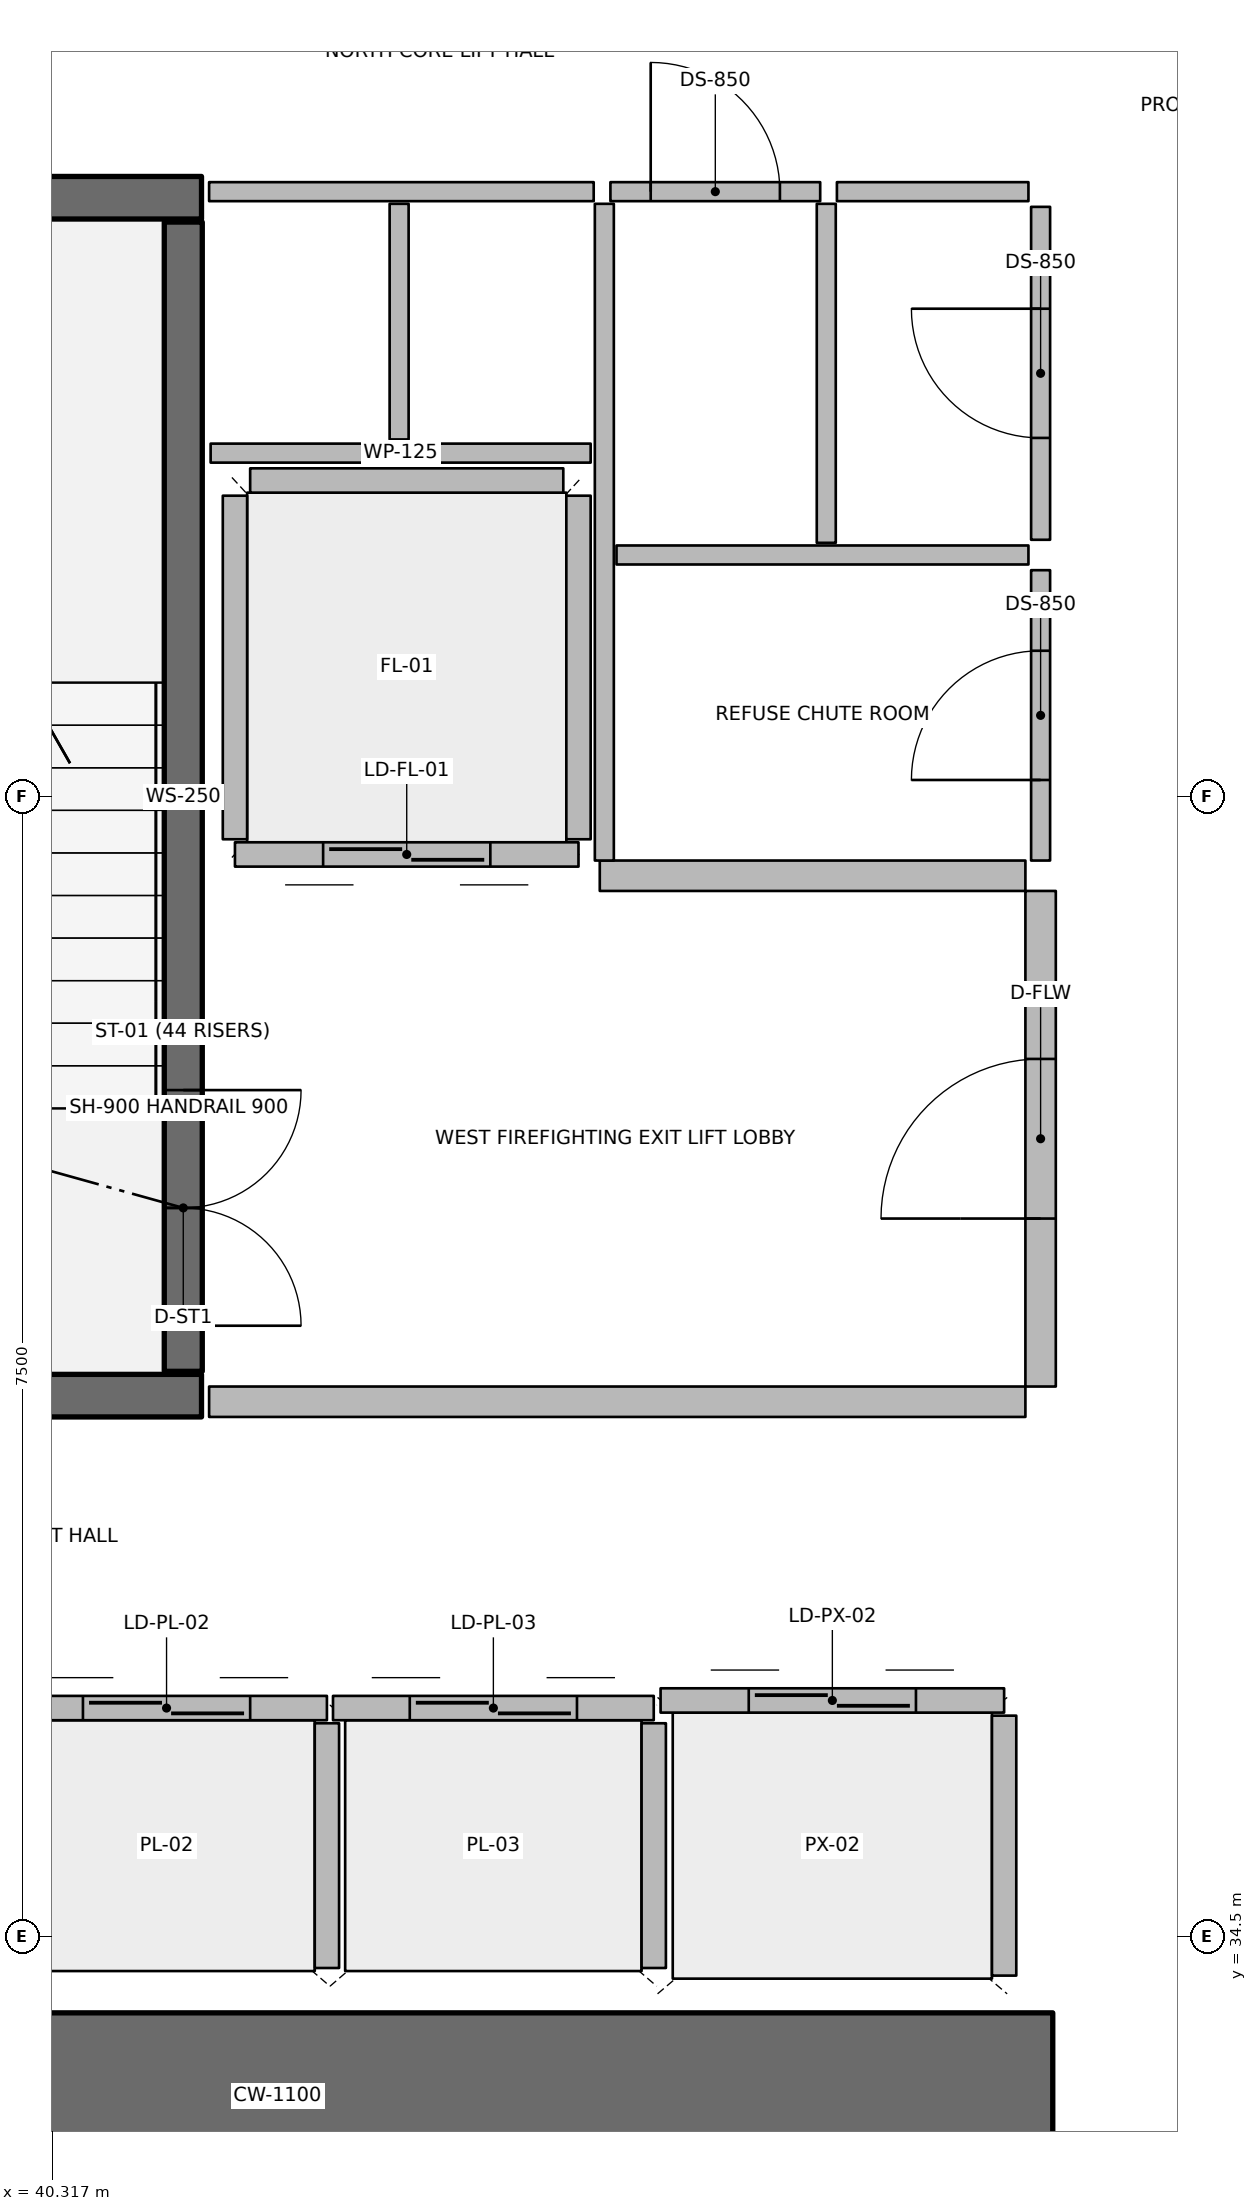
"""IFC4 building model, lengths in metres.
Left out: names, types, materials, properties, quantities, classifications, styles, units other than length and angle.
Written with IfcOpenShell. Run it as: python <this file> out.ifc"""

import sys

from ifc_helpers import new_model, si_unit, direction, frame, frame_2d, origin, origin_2d, place, context, subcontext, project, spatial, rectangle, hollow_rectangle, extrude, element, fill, save


model = new_model("IFC4")
c1 = context("Model", 3, precision=1e-05, world=origin(), true_north=direction((0.0, 1.0)))
c2 = subcontext(c1, "Body", "Model", "MODEL_VIEW")
j1 = project(units=[si_unit("LENGTHUNIT", "METRE"), si_unit("PLANEANGLEUNIT", "RADIAN")], contexts=[c1])
p1 = place(None, origin())
s1 = spatial("IfcSite", under=j1, at=p1, CompositionType="ELEMENT")
p2 = place(p1, origin())
s2 = spatial("IfcBuilding", under=s1, at=p2, CompositionType="ELEMENT")
p3 = place(p2, origin())
s3 = spatial("IfcBuildingStorey", under=s2, at=p3, CompositionType="ELEMENT", Elevation=0.0)
p4 = place(p3, frame((36.7, 33.45, 0.0), z_axis=(0.0, 0.0, 1.0), x_axis=(1.0, 0.0, 0.0)))
e1 = element("IfcWall", 1, at=p4, inside=s3, PredefinedType="SHEAR", context=c2, shape_type="SweptSolid", body=[
    extrude(rectangle(XDim=10.2, YDim=1.1, at=frame_2d((5.1, 0.0))), origin(), (0.0, 0.0, 1.0), 7.2),
])
for number, where, z_axis, x_axis in (
    (2, (37.8, 38.06, 0.0), (0.0, 0.0, 1.0), (1.0, 0.0, 0.0)),
    (3, (37.8, 45.94, 0.0), (0.0, 0.0, 1.0), (1.0, 0.0, 0.0)),
):
    element("IfcWall", number, at=place(p3, frame(where, z_axis=z_axis, x_axis=x_axis)), inside=s3, PredefinedType="SHEAR", context=c2, shape_type="SweptSolid", body=[
        extrude(rectangle(XDim=3.5, YDim=0.28, at=frame_2d((1.75, 0.0))), origin(), (0.0, 0.0, 1.0), 7.2),
    ])
p5 = place(p3, frame((41.18, 42.75, 0.0), z_axis=(0.0, 0.0, 1.0), x_axis=(1.0, 0.0, 0.0)))
e4 = element("IfcColumn", 4, at=p5, inside=s3, PredefinedType="COLUMN", context=c2, shape_type="SweptSolid", body=[
    extrude(hollow_rectangle(XDim=0.2, YDim=0.2, WallThickness=0.01, InnerFilletRadius=0.01, OuterFilletRadius=0.02, at=origin_2d()), origin(), (0.0, 0.0, 1.0), 1.595),
])
p6 = place(p3, frame((41.18, 43.45, 0.0), z_axis=(0.0, 0.0, 1.0), x_axis=(1.0, 0.0, 0.0)))
e5 = element("IfcColumn", 5, at=p6, inside=s3, PredefinedType="COLUMN", context=c2, shape_type="SweptSolid", body=[
    extrude(hollow_rectangle(XDim=0.2, YDim=0.2, WallThickness=0.01, InnerFilletRadius=0.01, OuterFilletRadius=0.02, at=origin_2d()), origin(), (0.0, 0.0, 1.0), 5.195),
])
p7 = place(p3, frame((41.18, 38.22, 0.0), z_axis=(0.0, 0.0, 1.0), x_axis=(0.0, 1.0, 0.0)))
e6 = element("IfcWall", 6, at=p7, inside=s3, PredefinedType="SOLIDWALL", context=c2, shape_type="SweptSolid", body=[
    extrude(rectangle(XDim=7.56, YDim=0.25, at=frame_2d((3.78, 0.0))), origin(), (0.0, 0.0, 1.0), 6.8),
])
p8 = place(p7, frame((0.3, 0.0, 0.0)))
e7 = element("IfcOpeningElement", 7, at=p8, cuts=e6, PredefinedType="OPENING", context=c2, shape_type="SweptSolid", body=[
    extrude(rectangle(XDim=1.55, YDim=2.15, at=frame_2d((0.775, 1.075))), frame((0.0, 0.135, 0.0), z_axis=(0.0, -1.0, 0.0), x_axis=(1.0, 0.0, 0.0)), (0.0, 0.0, 1.0), 0.27),
])
p9 = place(p3, frame((40.015, 36.005, 0.0), z_axis=(0.0, 0.0, 1.0), x_axis=(1.0, 0.0, 0.0)))
e8 = element("IfcWall", 8, at=p9, inside=s3, PredefinedType="PARTITIONING", context=c2, shape_type="SweptSolid", body=[
    extrude(rectangle(XDim=2.11, YDim=0.16, at=frame_2d((1.055, 0.0))), origin(), (0.0, 0.0, 1.0), 6.8),
])
p10 = place(p9, frame((0.505, 0.0, 0.0)))
e9 = element("IfcOpeningElement", 9, at=p10, cuts=e8, PredefinedType="OPENING", context=c2, shape_type="SweptSolid", body=[
    extrude(rectangle(XDim=1.1, YDim=2.1, at=frame_2d((0.55, 1.05))), frame((0.0, 0.09, 0.0), z_axis=(0.0, -1.0, 0.0), x_axis=(1.0, 0.0, 0.0)), (0.0, 0.0, 1.0), 0.18),
])
p11 = place(p3, frame((42.125, 34.295, 0.0), z_axis=(0.0, 0.0, 1.0), x_axis=(0.0, 1.0, 0.0)))
e10 = element("IfcWall", 10, at=p11, inside=s3, PredefinedType="PARTITIONING", context=c2, shape_type="SweptSolid", body=[
    extrude(rectangle(XDim=1.61, YDim=0.16, at=frame_2d((0.805, 0.0))), origin(), (0.0, 0.0, 1.0), 6.8),
])
p12 = place(p3, frame((42.165, 36.005, 0.0), z_axis=(0.0, 0.0, 1.0), x_axis=(1.0, 0.0, 0.0)))
e11 = element("IfcWall", 11, at=p12, inside=s3, PredefinedType="PARTITIONING", context=c2, shape_type="SweptSolid", body=[
    extrude(rectangle(XDim=2.11, YDim=0.16, at=frame_2d((1.055, 0.0))), origin(), (0.0, 0.0, 1.0), 6.8),
])
p13 = place(p12, frame((0.505, 0.0, 0.0)))
e12 = element("IfcOpeningElement", 12, at=p13, cuts=e11, PredefinedType="OPENING", context=c2, shape_type="SweptSolid", body=[
    extrude(rectangle(XDim=1.1, YDim=2.1, at=frame_2d((0.55, 1.05))), frame((0.0, 0.09, 0.0), z_axis=(0.0, -1.0, 0.0), x_axis=(1.0, 0.0, 0.0)), (0.0, 0.0, 1.0), 0.18),
])
p14 = place(p3, frame((44.275, 34.295, 0.0), z_axis=(0.0, 0.0, 1.0), x_axis=(0.0, 1.0, 0.0)))
e13 = element("IfcWall", 13, at=p14, inside=s3, PredefinedType="PARTITIONING", context=c2, shape_type="SweptSolid", body=[
    extrude(rectangle(XDim=1.61, YDim=0.16, at=frame_2d((0.805, 0.0))), origin(), (0.0, 0.0, 1.0), 6.8),
])
p15 = place(p3, frame((44.32, 36.055, 0.0), z_axis=(0.0, 0.0, 1.0), x_axis=(1.0, 0.0, 0.0)))
e14 = element("IfcWall", 14, at=p15, inside=s3, PredefinedType="PARTITIONING", context=c2, shape_type="SweptSolid", body=[
    extrude(rectangle(XDim=2.26, YDim=0.16, at=frame_2d((1.13, 0.0))), origin(), (0.0, 0.0, 1.0), 6.8),
])
p16 = place(p15, frame((0.58, 0.0, 0.0)))
e15 = element("IfcOpeningElement", 15, at=p16, cuts=e14, PredefinedType="OPENING", context=c2, shape_type="SweptSolid", body=[
    extrude(rectangle(XDim=1.1, YDim=2.1, at=frame_2d((0.55, 1.05))), frame((0.0, 0.09, 0.0), z_axis=(0.0, -1.0, 0.0), x_axis=(1.0, 0.0, 0.0)), (0.0, 0.0, 1.0), 0.18),
])
p17 = place(p3, frame((46.58, 34.245, 0.0), z_axis=(0.0, 0.0, 1.0), x_axis=(0.0, 1.0, 0.0)))
e16 = element("IfcWall", 16, at=p17, inside=s3, PredefinedType="PARTITIONING", context=c2, shape_type="SweptSolid", body=[
    extrude(rectangle(XDim=1.71, YDim=0.16, at=frame_2d((0.855, 0.0))), origin(), (0.0, 0.0, 1.0), 6.8),
])
p18 = place(p3, frame((43.78, 41.62, 0.0), z_axis=(0.0, 0.0, 1.0), x_axis=(-1.0, 0.0, 0.0)))
e17 = element("IfcWall", 17, at=p18, inside=s3, PredefinedType="PARTITIONING", context=c2, shape_type="SweptSolid", body=[
    extrude(rectangle(XDim=2.26, YDim=0.16, at=frame_2d((1.13, 0.0))), origin(), (0.0, 0.0, 1.0), 6.8),
])
p19 = place(p18, frame((0.58, 0.0, 0.0)))
e18 = element("IfcOpeningElement", 18, at=p19, cuts=e17, PredefinedType="OPENING", context=c2, shape_type="SweptSolid", body=[
    extrude(rectangle(XDim=1.1, YDim=2.1, at=frame_2d((0.55, 1.05))), frame((0.0, 0.09, 0.0), z_axis=(0.0, -1.0, 0.0), x_axis=(1.0, 0.0, 0.0)), (0.0, 0.0, 1.0), 0.18),
])
for number, where, z_axis, x_axis in (
    (19, (43.78, 41.72, 0.0), (0.0, 0.0, 1.0), (0.0, 1.0, 0.0)),
    (20, (41.52, 41.72, 0.0), (0.0, 0.0, 1.0), (0.0, 1.0, 0.0)),
):
    element("IfcWall", number, at=place(p3, frame(where, z_axis=z_axis, x_axis=x_axis)), inside=s3, PredefinedType="PARTITIONING", context=c2, shape_type="SweptSolid", body=[
        extrude(rectangle(XDim=2.26, YDim=0.16, at=frame_2d((1.13, 0.0))), origin(), (0.0, 0.0, 1.0), 6.8),
    ])
p20 = place(p3, frame((41.62, 44.08, 0.0), z_axis=(0.0, 0.0, 1.0), x_axis=(1.0, 0.0, 0.0)))
e21 = element("IfcWall", 21, at=p20, inside=s3, PredefinedType="PARTITIONING", context=c2, shape_type="SweptSolid", body=[
    extrude(rectangle(XDim=2.06, YDim=0.16, at=frame_2d((1.03, 0.0))), origin(), (0.0, 0.0, 1.0), 6.8),
])
p21 = place(p3, frame((41.35, 38.02, 0.0), z_axis=(0.0, 0.0, 1.0), x_axis=(1.0, 0.0, 0.0)))
e22 = element("IfcWall", 22, at=p21, inside=s3, PredefinedType="PARTITIONING", context=c2, shape_type="SweptSolid", body=[
    extrude(rectangle(XDim=5.37, YDim=0.2, at=frame_2d((2.685, 0.0))), origin(), (0.0, 0.0, 1.0), 6.8),
])
p22 = place(p3, frame((43.92, 41.48, 0.0), z_axis=(0.0, 0.0, 1.0), x_axis=(1.0, 0.0, 0.0)))
e23 = element("IfcWall", 23, at=p22, inside=s3, PredefinedType="PARTITIONING", context=c2, shape_type="SweptSolid", body=[
    extrude(rectangle(XDim=2.8, YDim=0.2, at=frame_2d((1.4, 0.0))), origin(), (0.0, 0.0, 1.0), 6.8),
])
p23 = place(p3, frame((46.82, 38.12, 0.0), z_axis=(0.0, 0.0, 1.0), x_axis=(0.0, 1.0, 0.0)))
e24 = element("IfcWall", 24, at=p23, inside=s3, PredefinedType="PARTITIONING", context=c2, shape_type="SweptSolid", body=[
    extrude(rectangle(XDim=3.26, YDim=0.2, at=frame_2d((1.63, 0.0))), origin(), (0.0, 0.0, 1.0), 6.8),
])
p24 = place(p23, frame((1.105, 0.0, 0.0)))
e25 = element("IfcOpeningElement", 25, at=p24, cuts=e24, PredefinedType="OPENING", context=c2, shape_type="SweptSolid", body=[
    extrude(rectangle(XDim=1.05, YDim=2.1, at=frame_2d((0.525, 1.05))), frame((0.0, 0.11, 0.0), z_axis=(0.0, -1.0, 0.0), x_axis=(1.0, 0.0, 0.0)), (0.0, 0.0, 1.0), 0.22),
])
p25 = place(p3, frame((41.36, 44.26, 0.0), z_axis=(0.0, 0.0, 1.0), x_axis=(1.0, 0.0, 0.0)))
e26 = element("IfcWall", 26, at=p25, inside=s3, PredefinedType="PARTITIONING", context=c2, shape_type="SweptSolid", body=[
    extrude(rectangle(XDim=2.5, YDim=0.125, at=frame_2d((1.25, 0.0))), origin(), (0.0, 0.0, 1.0), 6.24),
])
p26 = place(p3, frame((42.6, 44.35, 0.0), z_axis=(0.0, 0.0, 1.0), x_axis=(0.0, 1.0, 0.0)))
e27 = element("IfcWall", 27, at=p26, inside=s3, PredefinedType="PARTITIONING", context=c2, shape_type="SweptSolid", body=[
    extrude(rectangle(XDim=1.55, YDim=0.125, at=frame_2d((0.775, 0.0))), origin(), (0.0, 0.0, 1.0), 6.24),
])
p27 = place(p3, frame((43.95, 41.58, 0.0), z_axis=(0.0, 0.0, 1.0), x_axis=(0.0, 1.0, 0.0)))
e28 = element("IfcWall", 28, at=p27, inside=s3, PredefinedType="PARTITIONING", context=c2, shape_type="SweptSolid", body=[
    extrude(rectangle(XDim=4.32, YDim=0.125, at=frame_2d((2.16, 0.0))), origin(), (0.0, 0.0, 1.0), 6.24),
])
p28 = place(p3, frame((44.03, 43.59, 0.0), z_axis=(0.0, 0.0, 1.0), x_axis=(1.0, 0.0, 0.0)))
e29 = element("IfcWall", 29, at=p28, inside=s3, PredefinedType="PARTITIONING", context=c2, shape_type="SweptSolid", body=[
    extrude(rectangle(XDim=2.71, YDim=0.125, at=frame_2d((1.355, 0.0))), origin(), (0.0, 0.0, 1.0), 6.24),
])
p29 = place(p3, frame((45.41, 43.67, 0.0), z_axis=(0.0, 0.0, 1.0), x_axis=(0.0, 1.0, 0.0)))
e30 = element("IfcWall", 30, at=p29, inside=s3, PredefinedType="PARTITIONING", context=c2, shape_type="SweptSolid", body=[
    extrude(rectangle(XDim=2.23, YDim=0.125, at=frame_2d((1.115, 0.0))), origin(), (0.0, 0.0, 1.0), 6.24),
])
p30 = place(p3, frame((46.82, 41.58, 0.0), z_axis=(0.0, 0.0, 1.0), x_axis=(0.0, 1.0, 0.0)))
e31 = element("IfcWall", 31, at=p30, inside=s3, PredefinedType="PARTITIONING", context=c2, shape_type="SweptSolid", body=[
    extrude(rectangle(XDim=1.91, YDim=0.125, at=frame_2d((0.955, 0.0))), origin(), (0.0, 0.0, 1.0), 6.24),
])
p31 = place(p30, frame((0.53, 0.0, 0.0)))
e32 = element("IfcOpeningElement", 32, at=p31, cuts=e31, PredefinedType="OPENING", context=c2, shape_type="SweptSolid", body=[
    extrude(rectangle(XDim=0.85, YDim=2.06, at=frame_2d((0.425, 1.03))), frame((0.0, 0.073, 0.0), z_axis=(0.0, -1.0, 0.0), x_axis=(1.0, 0.0, 0.0)), (0.0, 0.0, 1.0), 0.145),
])
p32 = place(p3, frame((46.82, 43.69, 0.0), z_axis=(0.0, 0.0, 1.0), x_axis=(0.0, 1.0, 0.0)))
e33 = element("IfcWall", 33, at=p32, inside=s3, PredefinedType="PARTITIONING", context=c2, shape_type="SweptSolid", body=[
    extrude(rectangle(XDim=2.19, YDim=0.125, at=frame_2d((1.095, 0.0))), origin(), (0.0, 0.0, 1.0), 6.24),
])
p33 = place(p32, frame((0.67, 0.0, 0.0)))
e34 = element("IfcOpeningElement", 34, at=p33, cuts=e33, PredefinedType="OPENING", context=c2, shape_type="SweptSolid", body=[
    extrude(rectangle(XDim=0.85, YDim=2.06, at=frame_2d((0.425, 1.03))), frame((0.0, 0.073, 0.0), z_axis=(0.0, -1.0, 0.0), x_axis=(1.0, 0.0, 0.0)), (0.0, 0.0, 1.0), 0.145),
])
p34 = place(p3, frame((41.35, 45.98, 0.0), z_axis=(0.0, 0.0, 1.0), x_axis=(1.0, 0.0, 0.0)))
e35 = element("IfcWall", 35, at=p34, inside=s3, PredefinedType="PARTITIONING", context=c2, shape_type="SweptSolid", body=[
    extrude(rectangle(XDim=2.53, YDim=0.125, at=frame_2d((1.265, 0.0))), origin(), (0.0, 0.0, 1.0), 6.24),
])
p35 = place(p3, frame((43.99, 45.98, 0.0), z_axis=(0.0, 0.0, 1.0), x_axis=(1.0, 0.0, 0.0)))
e36 = element("IfcWall", 36, at=p35, inside=s3, PredefinedType="PARTITIONING", context=c2, shape_type="SweptSolid", body=[
    extrude(rectangle(XDim=1.38, YDim=0.125, at=frame_2d((0.69, 0.0))), origin(), (0.0, 0.0, 1.0), 6.24),
])
p36 = place(p35, frame((0.265, 0.0, 0.0)))
e37 = element("IfcOpeningElement", 37, at=p36, cuts=e36, PredefinedType="OPENING", context=c2, shape_type="SweptSolid", body=[
    extrude(rectangle(XDim=0.85, YDim=2.06, at=frame_2d((0.425, 1.03))), frame((0.0, 0.073, 0.0), z_axis=(0.0, -1.0, 0.0), x_axis=(1.0, 0.0, 0.0)), (0.0, 0.0, 1.0), 0.145),
])
p37 = place(p3, frame((45.48, 45.98, 0.0), z_axis=(0.0, 0.0, 1.0), x_axis=(1.0, 0.0, 0.0)))
e38 = element("IfcWall", 38, at=p37, inside=s3, PredefinedType="PARTITIONING", context=c2, shape_type="SweptSolid", body=[
    extrude(rectangle(XDim=1.26, YDim=0.125, at=frame_2d((0.63, 0.0))), origin(), (0.0, 0.0, 1.0), 6.24),
])
p38 = place(p8, origin())
e39 = element("IfcDoor", 39, at=p38, inside=s3, OperationType="DOUBLE_DOOR_SINGLE_SWING", PredefinedType="DOOR", context=c2, shape_type="SweptSolid", body=[
    extrude(rectangle(XDim=1.55, YDim=2.15, at=frame_2d((0.775, 1.075))), frame((0.0, 0.025, 0.0), z_axis=(0.0, -1.0, 0.0), x_axis=(1.0, 0.0, 0.0)), (0.0, 0.0, 1.0), 0.05),
])
fill(e7, e39)
p39 = place(p10, origin())
e40 = element("IfcDoor", 40, at=p39, inside=s3, OperationType="DOUBLE_DOOR_SLIDING", PredefinedType="DOOR", context=c2, shape_type="SweptSolid", body=[
    extrude(rectangle(XDim=1.1, YDim=2.1, at=frame_2d((0.55, 1.05))), frame((0.0, 0.025, 0.0), z_axis=(0.0, -1.0, 0.0), x_axis=(1.0, 0.0, 0.0)), (0.0, 0.0, 1.0), 0.05),
])
fill(e9, e40)
p40 = place(p13, origin())
e41 = element("IfcDoor", 41, at=p40, inside=s3, OperationType="DOUBLE_DOOR_SLIDING", PredefinedType="DOOR", context=c2, shape_type="SweptSolid", body=[
    extrude(rectangle(XDim=1.1, YDim=2.1, at=frame_2d((0.55, 1.05))), frame((0.0, 0.025, 0.0), z_axis=(0.0, -1.0, 0.0), x_axis=(1.0, 0.0, 0.0)), (0.0, 0.0, 1.0), 0.05),
])
fill(e12, e41)
p41 = place(p16, origin())
e42 = element("IfcDoor", 42, at=p41, inside=s3, OperationType="DOUBLE_DOOR_SLIDING", PredefinedType="DOOR", context=c2, shape_type="SweptSolid", body=[
    extrude(rectangle(XDim=1.1, YDim=2.1, at=frame_2d((0.55, 1.05))), frame((0.0, 0.025, 0.0), z_axis=(0.0, -1.0, 0.0), x_axis=(1.0, 0.0, 0.0)), (0.0, 0.0, 1.0), 0.05),
])
fill(e15, e42)
p42 = place(p19, origin())
e43 = element("IfcDoor", 43, at=p42, inside=s3, OperationType="DOUBLE_DOOR_SLIDING", PredefinedType="DOOR", context=c2, shape_type="SweptSolid", body=[
    extrude(rectangle(XDim=1.1, YDim=2.1, at=frame_2d((0.55, 1.05))), frame((0.0, 0.025, 0.0), z_axis=(0.0, -1.0, 0.0), x_axis=(1.0, 0.0, 0.0)), (0.0, 0.0, 1.0), 0.05),
])
fill(e18, e43)
p43 = place(p24, origin())
e44 = element("IfcDoor", 44, at=p43, inside=s3, OperationType="SINGLE_SWING_LEFT", PredefinedType="DOOR", context=c2, shape_type="SweptSolid", body=[
    extrude(rectangle(XDim=1.05, YDim=2.1, at=frame_2d((0.525, 1.05))), frame((0.0, 0.025, 0.0), z_axis=(0.0, -1.0, 0.0), x_axis=(1.0, 0.0, 0.0)), (0.0, 0.0, 1.0), 0.05),
])
fill(e25, e44)
p44 = place(p31, origin())
e45 = element("IfcDoor", 45, at=p44, inside=s3, OperationType="SINGLE_SWING_LEFT", PredefinedType="DOOR", context=c2, shape_type="SweptSolid", body=[
    extrude(rectangle(XDim=0.85, YDim=2.06, at=frame_2d((0.425, 1.03))), frame((0.0, 0.025, 0.0), z_axis=(0.0, -1.0, 0.0), x_axis=(1.0, 0.0, 0.0)), (0.0, 0.0, 1.0), 0.05),
])
fill(e32, e45)
p45 = place(p33, origin())
e46 = element("IfcDoor", 46, at=p45, inside=s3, OperationType="SINGLE_SWING_RIGHT", PredefinedType="DOOR", context=c2, shape_type="SweptSolid", body=[
    extrude(rectangle(XDim=0.85, YDim=2.06, at=frame_2d((0.425, 1.03))), frame((0.0, 0.025, 0.0), z_axis=(0.0, -1.0, 0.0), x_axis=(1.0, 0.0, 0.0)), (0.0, 0.0, 1.0), 0.05),
])
fill(e34, e46)
p46 = place(p36, origin())
e47 = element("IfcDoor", 47, at=p46, inside=s3, OperationType="SINGLE_SWING_LEFT", PredefinedType="DOOR", context=c2, shape_type="SweptSolid", body=[
    extrude(rectangle(XDim=0.85, YDim=2.06, at=frame_2d((0.425, 1.03))), frame((0.0, 0.025, 0.0), z_axis=(0.0, -1.0, 0.0), x_axis=(1.0, 0.0, 0.0)), (0.0, 0.0, 1.0), 0.05),
])
fill(e37, e47)
save(model, sys.argv[1])
